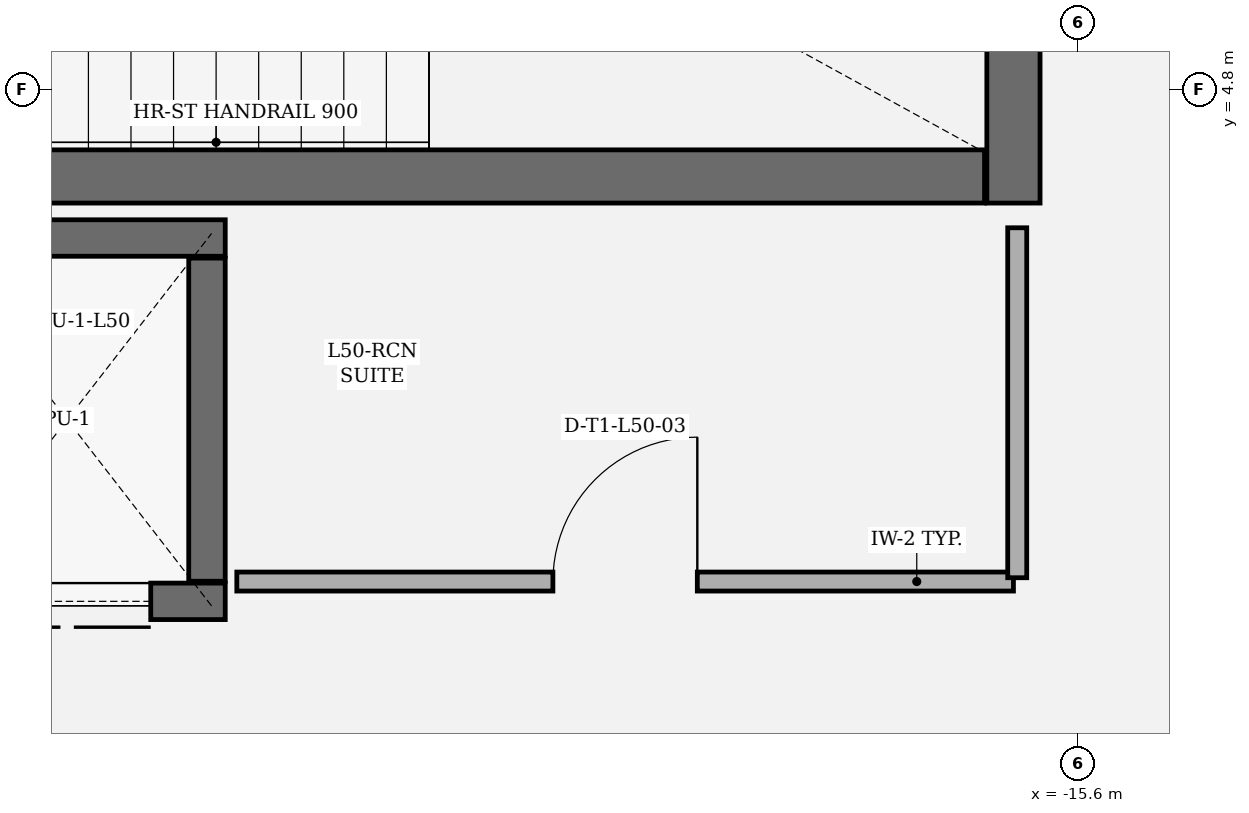
"""IFC4 building model, lengths in metres.
Left out: names, types, materials, properties, quantities, classifications, styles, units other than length and angle.
Written with IfcOpenShell. Run it as: python <this file> out.ifc"""

import sys

from ifc_helpers import new_model, si_unit, direction, frame, frame_2d, origin, place, context, subcontext, project, spatial, rectangle, extrude, element, fill, save


model = new_model("IFC4")
c1 = context("Model", 3, precision=1e-05, world=origin(), true_north=direction((0.0, 1.0)))
c2 = subcontext(c1, "Body", "Model", "MODEL_VIEW")
j1 = project(units=[si_unit("LENGTHUNIT", "METRE"), si_unit("PLANEANGLEUNIT", "RADIAN")], contexts=[c1])
p1 = place(None, origin())
s1 = spatial("IfcSite", under=j1, at=p1, CompositionType="ELEMENT")
p2 = place(p1, origin())
s2 = spatial("IfcBuilding", under=s1, at=p2, CompositionType="ELEMENT")
p3 = place(p2, frame((0.0, 0.0, 217.2)))
s3 = spatial("IfcBuildingStorey", under=s2, at=p3, CompositionType="ELEMENT", Elevation=217.2)
p4 = place(p3, frame((-16.025, 4.05, 0.0), z_axis=(0.0, 0.0, 1.0), x_axis=(0.0, 1.0, 0.0)))
e1 = element("IfcWall", 1, at=p4, inside=s3, PredefinedType="SHEAR", context=c2, shape_type="SweptSolid", body=[
    extrude(rectangle(XDim=4.21, YDim=0.35, at=frame_2d((2.105, 0.0))), origin(), (0.0, 0.0, 1.0), 3.78),
])
p5 = place(p3, frame((-24.335, 4.225, 0.0), z_axis=(0.0, 0.0, 1.0), x_axis=(1.0, 0.0, 0.0)))
e2 = element("IfcWall", 2, at=p5, inside=s3, PredefinedType="SHEAR", context=c2, shape_type="SweptSolid", body=[
    extrude(rectangle(XDim=8.12, YDim=0.35, at=frame_2d((4.06, 0.0))), origin(), (0.0, 0.0, 1.0), 3.78),
])
p6 = place(p3, frame((-21.21, 1.43, 0.0), z_axis=(0.0, 0.0, 1.0), x_axis=(-1.0, 0.0, 0.0)))
e3 = element("IfcWall", 3, at=p6, inside=s3, PredefinedType="SHEAR", context=c2, shape_type="SweptSolid", body=[
    extrude(rectangle(XDim=2.08, YDim=0.24, at=frame_2d((1.04, 0.0))), origin(), (0.0, 0.0, 1.0), 3.78),
])
p7 = place(p6, frame((0.49, 0.0, 0.0)))
e4 = element("IfcOpeningElement", 4, at=p7, cuts=e3, PredefinedType="OPENING", context=c2, shape_type="SweptSolid", body=[
    extrude(rectangle(XDim=1.1, YDim=2.2, at=frame_2d((0.55, 1.1))), frame((0.0, 0.13, 0.0), z_axis=(0.0, -1.0, 0.0), x_axis=(1.0, 0.0, 0.0)), (0.0, 0.0, 1.0), 0.26),
])
p8 = place(p3, frame((-23.29, 3.82, 0.0), z_axis=(0.0, 0.0, 1.0), x_axis=(1.0, 0.0, 0.0)))
e5 = element("IfcWall", 5, at=p8, inside=s3, PredefinedType="SHEAR", context=c2, shape_type="SweptSolid", body=[
    extrude(rectangle(XDim=2.08, YDim=0.24, at=frame_2d((1.04, 0.0))), origin(), (0.0, 0.0, 1.0), 3.78),
])
p9 = place(p3, frame((-21.33, 3.688, 0.0), z_axis=(0.0, 0.0, 1.0), x_axis=(0.0, -1.0, 0.0)))
e6 = element("IfcWall", 6, at=p9, inside=s3, PredefinedType="SHEAR", context=c2, shape_type="SweptSolid", body=[
    extrude(rectangle(XDim=2.126, YDim=0.24, at=frame_2d((1.063, 0.0))), origin(), (0.0, 0.0, 1.0), 3.78),
])
p10 = place(p3, frame((-21.134, 1.56, 0.0), z_axis=(0.0, 0.0, 1.0), x_axis=(1.0, 0.0, 0.0)))
e7 = element("IfcWall", 7, at=p10, inside=s3, PredefinedType="PARTITIONING", context=c2, shape_type="SweptSolid", body=[
    extrude(rectangle(XDim=5.109, YDim=0.125, at=frame_2d((2.554, 0.0))), origin(), (0.0, 0.0, 1.0), 3.78),
])
p11 = place(p10, frame((2.079, 0.0, 0.0)))
e8 = element("IfcOpeningElement", 8, at=p11, cuts=e7, PredefinedType="OPENING", context=c2, shape_type="SweptSolid", body=[
    extrude(rectangle(XDim=0.95, YDim=2.15, at=frame_2d((0.475, 1.075))), frame((0.0, 0.073, 0.0), z_axis=(0.0, -1.0, 0.0), x_axis=(1.0, 0.0, 0.0)), (0.0, 0.0, 1.0), 0.145),
])
p12 = place(p3, frame((-16.0, 1.585, 0.0), z_axis=(0.0, 0.0, 1.0), x_axis=(0.0, 1.0, 0.0)))
e9 = element("IfcWall", 9, at=p12, inside=s3, PredefinedType="PARTITIONING", context=c2, shape_type="SweptSolid", body=[
    extrude(rectangle(XDim=2.302, YDim=0.125, at=frame_2d((1.151, 0.0))), origin(), (0.0, 0.0, 1.0), 3.78),
])
p13 = place(p7, origin())
e10 = element("IfcDoor", 10, at=p13, inside=s3, OperationType="DOUBLE_DOOR_SLIDING", PredefinedType="DOOR", context=c2, shape_type="SweptSolid", body=[
    extrude(rectangle(XDim=1.1, YDim=2.2, at=frame_2d((0.55, 1.1))), frame((0.0, 0.025, 0.0), z_axis=(0.0, -1.0, 0.0), x_axis=(1.0, 0.0, 0.0)), (0.0, 0.0, 1.0), 0.05),
])
fill(e4, e10)
p14 = place(p11, origin())
e11 = element("IfcDoor", 11, at=p14, inside=s3, OperationType="SINGLE_SWING_RIGHT", PredefinedType="DOOR", context=c2, shape_type="SweptSolid", body=[
    extrude(rectangle(XDim=0.95, YDim=2.15, at=frame_2d((0.475, 1.075))), frame((0.0, 0.025, 0.0), z_axis=(0.0, -1.0, 0.0), x_axis=(1.0, 0.0, 0.0)), (0.0, 0.0, 1.0), 0.05),
])
fill(e8, e11)
save(model, sys.argv[1])
